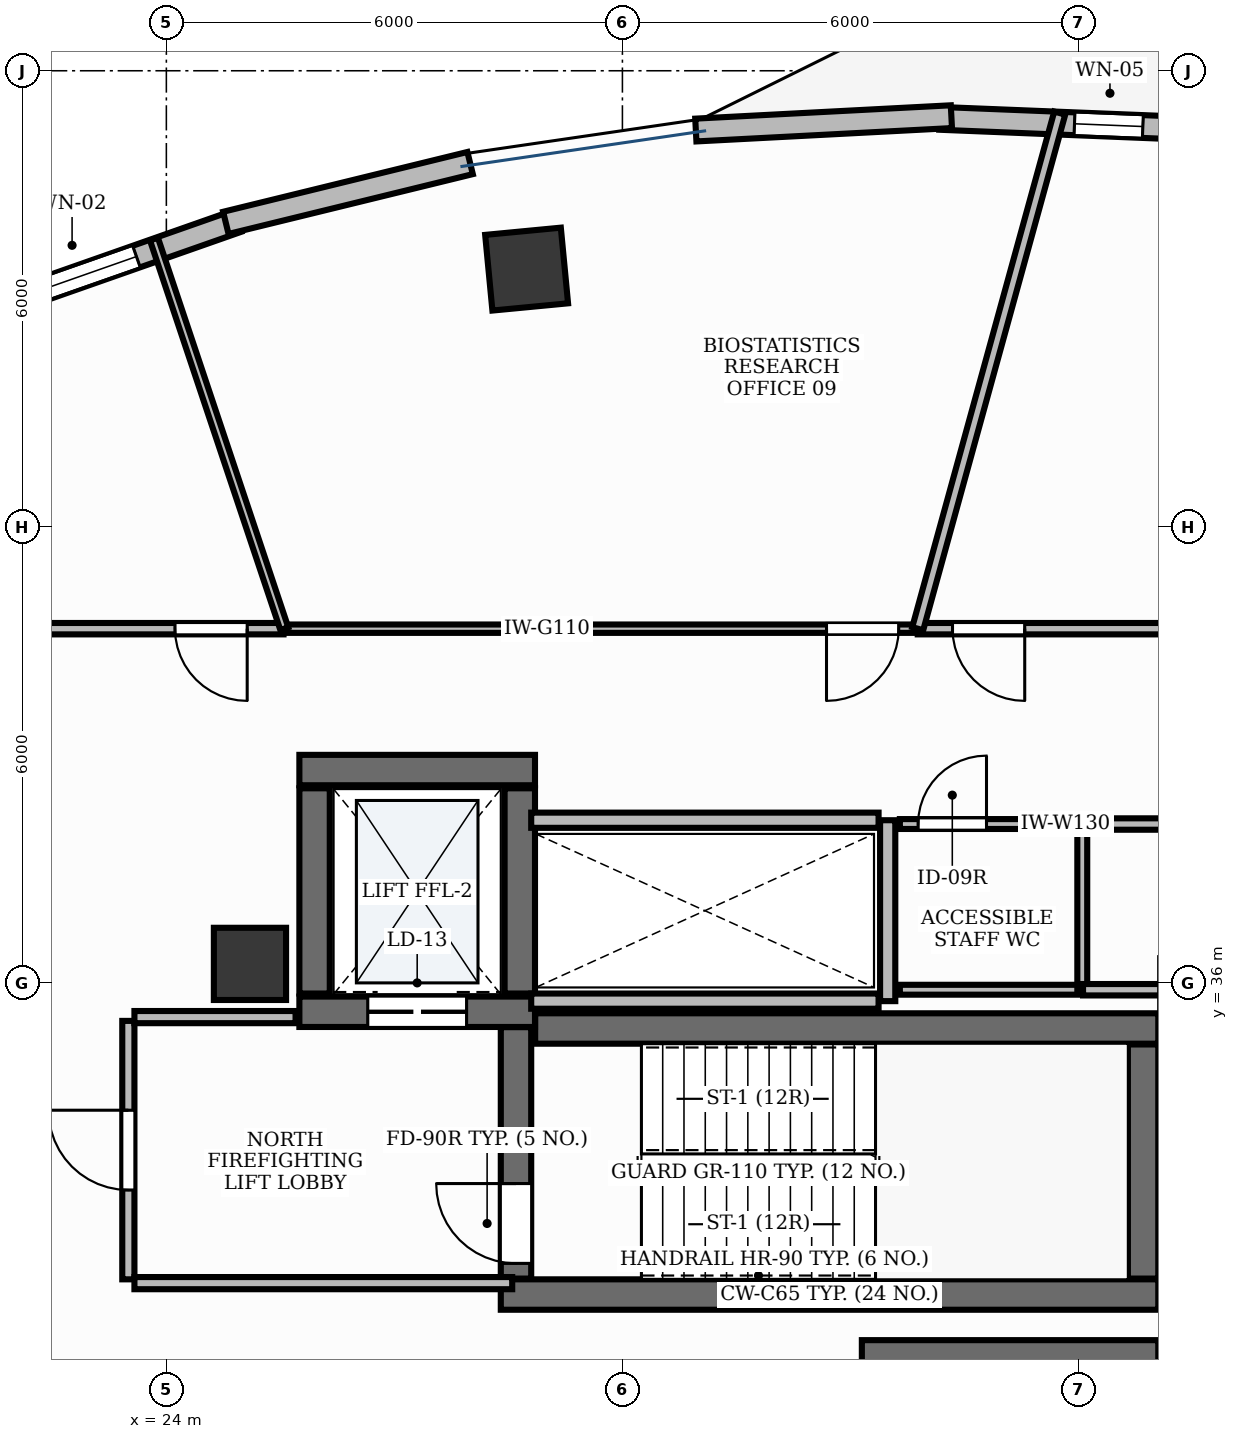
"""IFC4 building model, lengths in metres.
Left out: names, types, materials, properties, quantities, classifications, styles, units other than length and angle.
Written with IfcOpenShell. Run it as: python <this file> out.ifc"""

import sys

from ifc_helpers import new_model, si_unit, direction, frame, frame_2d, origin, origin_2d, place, context, subcontext, project, spatial, rectangle, extrude, element, fill, save


model = new_model("IFC4")
c1 = context("Model", 3, precision=1e-05, world=origin(), true_north=direction((0.0, 1.0)))
c2 = subcontext(c1, "Body", "Model", "MODEL_VIEW")
j1 = project(units=[si_unit("LENGTHUNIT", "METRE"), si_unit("PLANEANGLEUNIT", "RADIAN")], contexts=[c1])
p1 = place(None, origin())
s1 = spatial("IfcSite", under=j1, at=p1, CompositionType="ELEMENT")
p2 = place(p1, origin())
s2 = spatial("IfcBuilding", under=s1, at=p2, CompositionType="ELEMENT")
p3 = place(p2, frame((0.0, 0.0, 162.6)))
s3 = spatial("IfcBuildingStorey", under=s2, at=p3, CompositionType="ELEMENT", Elevation=162.6)
p4 = place(p3, frame((28.852, 35.4, 0.0), z_axis=(0.0, 0.0, 1.0), x_axis=(1.0, 0.0, 0.0)))
e1 = element("IfcWall", 1, at=p4, inside=s3, PredefinedType="SHEAR", context=c2, shape_type="SweptSolid", body=[
    extrude(rectangle(XDim=8.198, YDim=0.4, at=frame_2d((4.099, 0.0))), origin(), (0.0, 0.0, 1.0), 3.79),
])
p5 = place(p3, frame((28.4, 31.9, 0.0), z_axis=(0.0, 0.0, 1.0), x_axis=(1.0, 0.0, 0.0)))
e2 = element("IfcWall", 2, at=p5, inside=s3, PredefinedType="SHEAR", context=c2, shape_type="SweptSolid", body=[
    extrude(rectangle(XDim=8.65, YDim=0.4, at=frame_2d((4.325, 0.0))), origin(), (0.0, 0.0, 1.0), 3.79),
])
p6 = place(p3, frame((36.85, 32.11, 0.0), z_axis=(0.0, 0.0, 1.0), x_axis=(0.0, 1.0, 0.0)))
e3 = element("IfcWall", 3, at=p6, inside=s3, PredefinedType="SHEAR", context=c2, shape_type="SweptSolid", body=[
    extrude(rectangle(XDim=3.08, YDim=0.4, at=frame_2d((1.54, 0.0))), origin(), (0.0, 0.0, 1.0), 3.79),
])
p7 = place(p3, frame((28.6, 32.11, 0.0), z_axis=(0.0, 0.0, 1.0), x_axis=(0.0, 1.0, 0.0)))
e4 = element("IfcWall", 4, at=p7, inside=s3, PredefinedType="SHEAR", context=c2, shape_type="SweptSolid", body=[
    extrude(rectangle(XDim=3.308, YDim=0.4, at=frame_2d((1.654, 0.0))), origin(), (0.0, 0.0, 1.0), 3.79),
])
p8 = place(p7, frame((0.2, 0.0, 0.0)))
e5 = element("IfcOpeningElement", 5, at=p8, cuts=e4, PredefinedType="OPENING", context=c2, shape_type="SweptSolid", body=[
    extrude(rectangle(XDim=1.05, YDim=2.15, at=frame_2d((0.525, 1.075))), frame((0.0, 0.215, 0.0), z_axis=(0.0, -1.0, 0.0), x_axis=(1.0, 0.0, 0.0)), (0.0, 0.0, 1.0), 0.43),
])
p9 = place(p3, frame((33.15, 31.1, 0.0), z_axis=(0.0, 0.0, 1.0), x_axis=(1.0, 0.0, 0.0)))
e6 = element("IfcWall", 6, at=p9, inside=s3, PredefinedType="SHEAR", context=c2, shape_type="SweptSolid", body=[
    extrude(rectangle(XDim=3.9, YDim=0.4, at=frame_2d((1.95, 0.0))), origin(), (0.0, 0.0, 1.0), 3.79),
])
p10 = place(p3, frame((25.75, 38.8, 0.0), z_axis=(0.0, 0.0, 1.0), x_axis=(1.0, 0.0, 0.0)))
e7 = element("IfcWall", 7, at=p10, inside=s3, PredefinedType="SHEAR", context=c2, shape_type="SweptSolid", body=[
    extrude(rectangle(XDim=3.1, YDim=0.4, at=frame_2d((1.55, 0.0))), origin(), (0.0, 0.0, 1.0), 3.79),
])
p11 = place(p3, frame((25.75, 35.62, 0.0), z_axis=(0.0, 0.0, 1.0), x_axis=(1.0, 0.0, 0.0)))
e8 = element("IfcWall", 8, at=p11, inside=s3, PredefinedType="SHEAR", context=c2, shape_type="SweptSolid", body=[
    extrude(rectangle(XDim=3.1, YDim=0.4, at=frame_2d((1.55, 0.0))), origin(), (0.0, 0.0, 1.0), 3.79),
])
p12 = place(p11, frame((0.9, 0.0, 0.0)))
e9 = element("IfcOpeningElement", 9, at=p12, cuts=e8, PredefinedType="OPENING", context=c2, shape_type="SweptSolid", body=[
    extrude(rectangle(XDim=1.3, YDim=2.2, at=frame_2d((0.65, 1.1))), frame((0.0, 0.215, 0.0), z_axis=(0.0, -1.0, 0.0), x_axis=(1.0, 0.0, 0.0)), (0.0, 0.0, 1.0), 0.43),
])
for number, where, z_axis, x_axis in (
    (10, (25.95, 35.86, 0.0), (0.0, 0.0, 1.0), (0.0, 1.0, 0.0)),
    (11, (28.65, 35.86, 0.0), (0.0, 0.0, 1.0), (0.0, 1.0, 0.0)),
):
    element("IfcWall", number, at=place(p3, frame(where, z_axis=z_axis, x_axis=x_axis)), inside=s3, PredefinedType="SHEAR", context=c2, shape_type="SweptSolid", body=[
        extrude(rectangle(XDim=2.7, YDim=0.4, at=frame_2d((1.35, 0.0))), origin(), (0.0, 0.0, 1.0), 3.79),
    ])
p13 = place(p3, frame((25.1, 36.25, -0.0), z_axis=(0.0, 0.0, 1.0), x_axis=(1.0, 0.0, 0.0)))
e12 = element("IfcColumn", 12, at=p13, inside=s3, PredefinedType="PILASTER", context=c2, shape_type="SweptSolid", body=[
    extrude(rectangle(XDim=0.95, YDim=0.95, at=origin_2d()), origin(), (0.0, 0.0, 1.0), 3.791),
])
p14 = place(p3, frame((28.74, 45.39, -0.0), z_axis=(0.0, 0.0, 1.0), x_axis=(0.995462868748, 0.095150811579, 0.0)))
e13 = element("IfcColumn", 13, at=p14, inside=s3, PredefinedType="COLUMN", context=c2, shape_type="SweptSolid", body=[
    extrude(rectangle(XDim=1.0, YDim=1.0, at=origin_2d()), origin(), (0.0, 0.0, 1.0), 3.791),
])
p15 = place(p3, frame((37.5, 47.24, 0.0), z_axis=(0.0, 0.0, 1.0), x_axis=(-0.999191674443, 0.040199474165, 0.0)))
e14 = element("IfcWall", 14, at=p15, inside=s3, PredefinedType="STANDARD", context=c2, shape_type="SweptSolid", body=[
    extrude(rectangle(XDim=3.328, YDim=0.3, at=frame_2d((1.664, 0.0))), origin(), (0.0, 0.0, 1.0), 3.36),
])
p16 = place(p15, frame((0.653, 0.0, 0.95)))
e15 = element("IfcOpeningElement", 15, at=p16, cuts=e14, PredefinedType="OPENING", context=c2, shape_type="SweptSolid", body=[
    extrude(rectangle(XDim=0.9, YDim=1.8, at=frame_2d((0.45, 0.9))), frame((0.0, 0.165, 0.0), z_axis=(0.0, -1.0, 0.0), x_axis=(1.0, 0.0, 0.0)), (0.0, 0.0, 1.0), 0.33),
])
p17 = place(p3, frame((24.937, 46.023, 0.0), z_axis=(0.0, 0.0, 1.0), x_axis=(-0.943495444321, -0.331385495377, 0.0)))
e16 = element("IfcWall", 16, at=p17, inside=s3, PredefinedType="STANDARD", context=c2, shape_type="SweptSolid", body=[
    extrude(rectangle(XDim=3.214, YDim=0.3, at=frame_2d((1.607, 0.0))), origin(), (0.0, 0.0, 1.0), 3.79),
])
p18 = place(p17, frame((1.41, 0.0, 0.95)))
e17 = element("IfcOpeningElement", 17, at=p18, cuts=e16, PredefinedType="OPENING", context=c2, shape_type="SweptSolid", body=[
    extrude(rectangle(XDim=1.5, YDim=1.8, at=frame_2d((0.75, 0.9))), frame((0.0, 0.165, 0.0), z_axis=(0.0, -1.0, 0.0), x_axis=(1.0, 0.0, 0.0)), (0.0, 0.0, 1.0), 0.33),
])
p19 = place(p3, frame((34.328, 47.396, 0.0), z_axis=(0.0, 0.0, 1.0), x_axis=(-0.998639777298, -0.052140149581, 0.0)))
e18 = element("IfcWall", 18, at=p19, inside=s3, PredefinedType="STANDARD", context=c2, shape_type="SweptSolid", body=[
    extrude(rectangle(XDim=3.367, YDim=0.3, at=frame_2d((1.683, 0.0))), origin(), (0.0, 0.0, 1.0), 3.36),
])
p20 = place(p3, frame((27.996, 46.786, 0.0), z_axis=(0.0, 0.0, 1.0), x_axis=(-0.971328615467, -0.237740868963, 0.0)))
e19 = element("IfcWall", 19, at=p20, inside=s3, PredefinedType="STANDARD", context=c2, shape_type="SweptSolid", body=[
    extrude(rectangle(XDim=3.309, YDim=0.3, at=frame_2d((1.654, 0.0))), origin(), (0.0, 0.0, 1.0), 3.79),
])
p21 = place(p3, frame((33.49, 35.76, 0.0), z_axis=(0.0, 0.0, 1.0), x_axis=(0.0, 1.0, 0.0)))
e20 = element("IfcWall", 20, at=p21, inside=s3, PredefinedType="PARTITIONING", context=c2, shape_type="SweptSolid", body=[
    extrude(rectangle(XDim=2.38, YDim=0.2, at=frame_2d((1.19, 0.0))), origin(), (0.0, 0.0, 1.0), 2.8),
])
for number, where, z_axis, x_axis in (
    (21, (28.8, 35.76, 0.0), (0.0, 0.0, 1.0), (1.0, 0.0, 0.0)),
    (22, (28.8, 38.14, 0.0), (0.0, 0.0, 1.0), (1.0, 0.0, 0.0)),
):
    element("IfcWall", number, at=place(p3, frame(where, z_axis=z_axis, x_axis=x_axis)), inside=s3, PredefinedType="PARTITIONING", context=c2, shape_type="SweptSolid", body=[
        extrude(rectangle(XDim=4.57, YDim=0.2, at=frame_2d((2.285, 0.0))), origin(), (0.0, 0.0, 1.0), 2.8),
    ])
p22 = place(p3, frame((23.5, 32.1, 0.0), z_axis=(0.0, 0.0, 1.0), x_axis=(0.0, 1.0, 0.0)))
e23 = element("IfcWall", 23, at=p22, inside=s3, PredefinedType="PARTITIONING", context=c2, shape_type="SweptSolid", body=[
    extrude(rectangle(XDim=3.4, YDim=0.16, at=frame_2d((1.7, 0.0))), origin(), (0.0, 0.0, 1.0), 2.8),
])
p23 = place(p22, frame((1.175, 0.0, 0.0)))
e24 = element("IfcOpeningElement", 24, at=p23, cuts=e23, PredefinedType="OPENING", context=c2, shape_type="SweptSolid", body=[
    extrude(rectangle(XDim=1.05, YDim=2.15, at=frame_2d((0.525, 1.075))), frame((0.0, 0.095, 0.0), z_axis=(0.0, -1.0, 0.0), x_axis=(1.0, 0.0, 0.0)), (0.0, 0.0, 1.0), 0.19),
])
p24 = place(p3, frame((23.58, 32.05, 0.0), z_axis=(0.0, 0.0, 1.0), x_axis=(1.0, 0.0, 0.0)))
e25 = element("IfcWall", 25, at=p24, inside=s3, PredefinedType="PARTITIONING", context=c2, shape_type="SweptSolid", body=[
    extrude(rectangle(XDim=4.97, YDim=0.16, at=frame_2d((2.485, 0.0))), origin(), (0.0, 0.0, 1.0), 2.8),
])
p25 = place(p3, frame((23.58, 35.55, 0.0), z_axis=(0.0, 0.0, 1.0), x_axis=(1.0, 0.0, 0.0)))
e26 = element("IfcWall", 26, at=p25, inside=s3, PredefinedType="PARTITIONING", context=c2, shape_type="SweptSolid", body=[
    extrude(rectangle(XDim=2.12, YDim=0.16, at=frame_2d((1.06, 0.0))), origin(), (0.0, 0.0, 1.0), 2.8),
])
p26 = place(p3, frame((33.65, 38.09, 0.0), z_axis=(0.0, 0.0, 1.0), x_axis=(1.0, 0.0, 0.0)))
e27 = element("IfcWall", 27, at=p26, inside=s3, PredefinedType="PARTITIONING", context=c2, shape_type="SweptSolid", body=[
    extrude(rectangle(XDim=2.4, YDim=0.13, at=frame_2d((1.2, 0.0))), origin(), (0.0, 0.0, 1.0), 2.8),
])
p27 = place(p26, frame((0.24, 0.0, 0.0)))
e28 = element("IfcOpeningElement", 28, at=p27, cuts=e27, PredefinedType="OPENING", context=c2, shape_type="SweptSolid", body=[
    extrude(rectangle(XDim=0.9, YDim=2.15, at=frame_2d((0.45, 1.075))), frame((0.0, 0.08, 0.0), z_axis=(0.0, -1.0, 0.0), x_axis=(1.0, 0.0, 0.0)), (0.0, 0.0, 1.0), 0.16),
])
p28 = place(p3, frame((37.2, 40.66, 0.0), z_axis=(0.0, 0.0, 1.0), x_axis=(-1.0, 0.0, 0.0)))
e29 = element("IfcWall", 29, at=p28, inside=s3, PredefinedType="PARTITIONING", context=c2, shape_type="SweptSolid", body=[
    extrude(rectangle(XDim=3.315, YDim=0.15, at=frame_2d((1.657, 0.0))), origin(), (0.0, 0.0, 1.0), 2.8),
])
p29 = place(p28, frame((1.907, 0.0, 0.0)))
e30 = element("IfcOpeningElement", 30, at=p29, cuts=e29, PredefinedType="OPENING", context=c2, shape_type="SweptSolid", body=[
    extrude(rectangle(XDim=0.95, YDim=2.15, at=frame_2d((0.475, 1.075))), frame((0.0, 0.09, 0.0), z_axis=(0.0, -1.0, 0.0), x_axis=(1.0, 0.0, 0.0)), (0.0, 0.0, 1.0), 0.18),
])
p30 = place(p3, frame((33.875, 40.66, 0.0), z_axis=(0.0, 0.0, 1.0), x_axis=(-1.0, 0.0, 0.0)))
e31 = element("IfcWall", 31, at=p30, inside=s3, PredefinedType="MOVABLE", context=c2, shape_type="SweptSolid", body=[
    extrude(rectangle(XDim=8.323, YDim=0.11, at=frame_2d((4.162, 0.0))), origin(), (0.0, 0.0, 1.0), 2.8),
])
p31 = place(p30, frame((0.24, 0.0, 0.0)))
e32 = element("IfcOpeningElement", 32, at=p31, cuts=e31, PredefinedType="OPENING", context=c2, shape_type="SweptSolid", body=[
    extrude(rectangle(XDim=0.95, YDim=2.15, at=frame_2d((0.475, 1.075))), frame((0.0, 0.07, 0.0), z_axis=(0.0, -1.0, 0.0), x_axis=(1.0, 0.0, 0.0)), (0.0, 0.0, 1.0), 0.14),
])
p32 = place(p3, frame((25.542, 40.66, 0.0), z_axis=(0.0, 0.0, 1.0), x_axis=(-1.0, 0.0, 0.0)))
e33 = element("IfcWall", 33, at=p32, inside=s3, PredefinedType="PARTITIONING", context=c2, shape_type="SweptSolid", body=[
    extrude(rectangle(XDim=3.792, YDim=0.15, at=frame_2d((1.896, 0.0))), origin(), (0.0, 0.0, 1.0), 2.8),
])
p33 = place(p32, frame((0.478, 0.0, 0.0)))
e34 = element("IfcOpeningElement", 34, at=p33, cuts=e33, PredefinedType="OPENING", context=c2, shape_type="SweptSolid", body=[
    extrude(rectangle(XDim=0.95, YDim=2.15, at=frame_2d((0.475, 1.075))), frame((0.0, 0.09, 0.0), z_axis=(0.0, -1.0, 0.0), x_axis=(1.0, 0.0, 0.0)), (0.0, 0.0, 1.0), 0.18),
])
p34 = place(p3, frame((36.05, 35.91, 0.0), z_axis=(0.0, 0.0, 1.0), x_axis=(-1.0, 0.0, 0.0)))
e35 = element("IfcWall", 35, at=p34, inside=s3, PredefinedType="PARTITIONING", context=c2, shape_type="SweptSolid", body=[
    extrude(rectangle(XDim=2.4, YDim=0.13, at=frame_2d((1.2, 0.0))), origin(), (0.0, 0.0, 1.0), 2.8),
])
p35 = place(p3, frame((36.05, 38.09, 0.0), z_axis=(0.0, 0.0, 1.0), x_axis=(0.0, -1.0, 0.0)))
e36 = element("IfcWall", 36, at=p35, inside=s3, PredefinedType="PARTITIONING", context=c2, shape_type="SweptSolid", body=[
    extrude(rectangle(XDim=2.18, YDim=0.13, at=frame_2d((1.09, 0.0))), origin(), (0.0, 0.0, 1.0), 2.8),
])
p36 = place(p3, frame((37.35, 35.91, 0.0), z_axis=(0.0, 0.0, 1.0), x_axis=(-1.0, 0.0, 0.0)))
e37 = element("IfcWall", 37, at=p36, inside=s3, PredefinedType="PARTITIONING", context=c2, shape_type="SweptSolid", body=[
    extrude(rectangle(XDim=1.29, YDim=0.15, at=frame_2d((0.645, 0.0))), origin(), (0.0, 0.0, 1.0), 2.8),
])
p37 = place(p3, frame((36.06, 38.09, 0.0), z_axis=(0.0, 0.0, 1.0), x_axis=(1.0, 0.0, 0.0)))
e38 = element("IfcWall", 38, at=p37, inside=s3, PredefinedType="PARTITIONING", context=c2, shape_type="SweptSolid", body=[
    extrude(rectangle(XDim=1.14, YDim=0.15, at=frame_2d((0.57, 0.0))), origin(), (0.0, 0.0, 1.0), 2.8),
])
p38 = place(p3, frame((33.885, 40.66, 0.0), z_axis=(0.0, 0.0, 1.0), x_axis=(0.26554760057, 0.964097750143, 0.0)))
e39 = element("IfcWall", 39, at=p38, inside=s3, PredefinedType="PARTITIONING", context=c2, shape_type="SweptSolid", body=[
    extrude(rectangle(XDim=7.036, YDim=0.15, at=frame_2d((3.518, 0.0))), origin(), (0.0, 0.0, 1.0), 2.8),
])
p39 = place(p3, frame((25.552, 40.66, 0.0), z_axis=(0.0, 0.0, 1.0), x_axis=(-0.317298174949, 0.948325823847, 0.0)))
e40 = element("IfcWall", 40, at=p39, inside=s3, PredefinedType="MOVABLE", context=c2, shape_type="SweptSolid", body=[
    extrude(rectangle(XDim=5.405, YDim=0.11, at=frame_2d((2.702, 0.0))), origin(), (0.0, 0.0, 1.0), 2.8),
])
p40 = place(p16, origin())
e41 = element("IfcWindow", 41, at=p40, inside=s3, PartitioningType="SINGLE_PANEL", PredefinedType="WINDOW", context=c2, shape_type="SweptSolid", body=[
    extrude(rectangle(XDim=0.9, YDim=1.8, at=frame_2d((0.45, 0.9))), frame((0.0, 0.03, 0.0), z_axis=(0.0, -1.0, 0.0), x_axis=(1.0, 0.0, 0.0)), (0.0, 0.0, 1.0), 0.06),
])
fill(e15, e41)
p41 = place(p18, origin())
e42 = element("IfcWindow", 42, at=p41, inside=s3, PartitioningType="DOUBLE_PANEL_VERTICAL", PredefinedType="WINDOW", context=c2, shape_type="SweptSolid", body=[
    extrude(rectangle(XDim=1.5, YDim=1.8, at=frame_2d((0.75, 0.9))), frame((0.0, 0.03, 0.0), z_axis=(0.0, -1.0, 0.0), x_axis=(1.0, 0.0, 0.0)), (0.0, 0.0, 1.0), 0.06),
])
fill(e17, e42)
p42 = place(p8, origin())
e43 = element("IfcDoor", 43, at=p42, inside=s3, OperationType="SINGLE_SWING_RIGHT", PredefinedType="DOOR", context=c2, shape_type="SweptSolid", body=[
    extrude(rectangle(XDim=1.05, YDim=2.15, at=frame_2d((0.525, 1.075))), frame((0.0, 0.025, 0.0), z_axis=(0.0, -1.0, 0.0), x_axis=(1.0, 0.0, 0.0)), (0.0, 0.0, 1.0), 0.05),
])
fill(e5, e43)
p43 = place(p12, origin())
e44 = element("IfcDoor", 44, at=p43, inside=s3, OperationType="DOUBLE_DOOR_SLIDING", PredefinedType="DOOR", context=c2, shape_type="SweptSolid", body=[
    extrude(rectangle(XDim=1.3, YDim=2.2, at=frame_2d((0.65, 1.1))), frame((0.0, 0.025, 0.0), z_axis=(0.0, -1.0, 0.0), x_axis=(1.0, 0.0, 0.0)), (0.0, 0.0, 1.0), 0.05),
])
fill(e9, e44)
p44 = place(p23, origin())
e45 = element("IfcDoor", 45, at=p44, inside=s3, OperationType="SINGLE_SWING_RIGHT", PredefinedType="DOOR", context=c2, shape_type="SweptSolid", body=[
    extrude(rectangle(XDim=1.05, YDim=2.15, at=frame_2d((0.525, 1.075))), frame((0.0, 0.025, 0.0), z_axis=(0.0, -1.0, 0.0), x_axis=(1.0, 0.0, 0.0)), (0.0, 0.0, 1.0), 0.05),
])
fill(e24, e45)
p45 = place(p27, origin())
e46 = element("IfcDoor", 46, at=p45, inside=s3, OperationType="SINGLE_SWING_RIGHT", PredefinedType="DOOR", context=c2, shape_type="SweptSolid", body=[
    extrude(rectangle(XDim=0.9, YDim=2.15, at=frame_2d((0.45, 1.075))), frame((0.0, 0.025, 0.0), z_axis=(0.0, -1.0, 0.0), x_axis=(1.0, 0.0, 0.0)), (0.0, 0.0, 1.0), 0.05),
])
fill(e28, e46)
p46 = place(p29, origin())
e47 = element("IfcDoor", 47, at=p46, inside=s3, OperationType="SINGLE_SWING_LEFT", PredefinedType="DOOR", context=c2, shape_type="SweptSolid", body=[
    extrude(rectangle(XDim=0.95, YDim=2.15, at=frame_2d((0.475, 1.075))), frame((0.0, 0.025, 0.0), z_axis=(0.0, -1.0, 0.0), x_axis=(1.0, 0.0, 0.0)), (0.0, 0.0, 1.0), 0.05),
])
fill(e30, e47)
p47 = place(p31, origin())
e48 = element("IfcDoor", 48, at=p47, inside=s3, OperationType="SINGLE_SWING_RIGHT", PredefinedType="DOOR", context=c2, shape_type="SweptSolid", body=[
    extrude(rectangle(XDim=0.95, YDim=2.15, at=frame_2d((0.475, 1.075))), frame((0.0, 0.025, 0.0), z_axis=(0.0, -1.0, 0.0), x_axis=(1.0, 0.0, 0.0)), (0.0, 0.0, 1.0), 0.05),
])
fill(e32, e48)
p48 = place(p33, origin())
e49 = element("IfcDoor", 49, at=p48, inside=s3, OperationType="SINGLE_SWING_LEFT", PredefinedType="DOOR", context=c2, shape_type="SweptSolid", body=[
    extrude(rectangle(XDim=0.95, YDim=2.15, at=frame_2d((0.475, 1.075))), frame((0.0, 0.025, 0.0), z_axis=(0.0, -1.0, 0.0), x_axis=(1.0, 0.0, 0.0)), (0.0, 0.0, 1.0), 0.05),
])
fill(e34, e49)
save(model, sys.argv[1])
